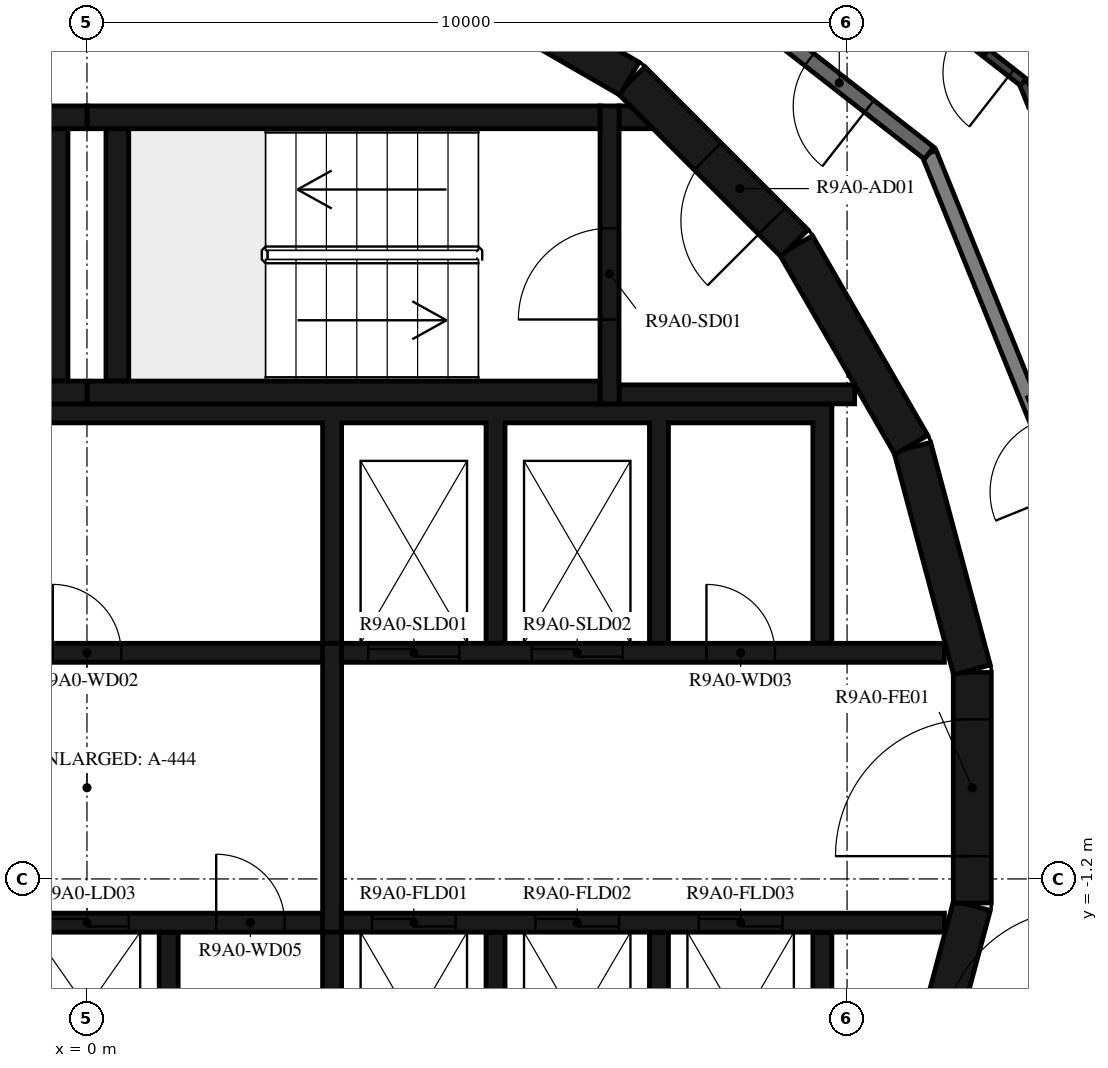
"""IFC4 building model, lengths in metres.
Left out: names, types, materials, properties, quantities, classifications, styles, units other than length and angle.
Written with IfcOpenShell. Run it as: python <this file> out.ifc"""

import sys

from ifc_helpers import new_model, si_unit, direction, frame, frame_2d, origin, place, context, subcontext, project, spatial, polyline, rectangle, outline, extrude, element, fill, save


model = new_model("IFC4")
c1 = context("Model", 3, precision=1e-05, world=origin(), true_north=direction((0.0, 1.0)))
c2 = subcontext(c1, "Body", "Model", "MODEL_VIEW")
j1 = project(units=[si_unit("LENGTHUNIT", "METRE"), si_unit("PLANEANGLEUNIT", "RADIAN")], contexts=[c1])
p1 = place(None, origin())
s1 = spatial("IfcSite", under=j1, at=p1, CompositionType="ELEMENT")
p2 = place(p1, origin())
s2 = spatial("IfcBuilding", under=s1, at=p2, CompositionType="ELEMENT")
p3 = place(p2, frame((0.0, 0.0, 340.0)))
s3 = spatial("IfcBuildingStorey", under=s2, at=p3, CompositionType="ELEMENT", Elevation=340.0)
p4 = place(p3, frame((10.858, -4.479, 0.0), z_axis=(0.0, 0.0, 1.0), x_axis=(0.258734743916, 0.965948410781, 0.0)))
e1 = element("IfcWall", 1, at=p4, inside=s3, PredefinedType="SHEAR", context=c2, shape_type="SweptSolid", body=[
    extrude(rectangle(XDim=3.033, YDim=0.5, at=frame_2d((1.516, 0.0))), origin(), (0.0, 0.0, 1.0), 3.12),
])
p5 = place(p3, frame((11.647, -1.516, 0.0), z_axis=(0.0, 0.0, 1.0), x_axis=(0.0, 1.0, 0.0)))
e2 = element("IfcWall", 2, at=p5, inside=s3, PredefinedType="SHEAR", context=c2, shape_type="SweptSolid", body=[
    extrude(rectangle(XDim=3.033, YDim=0.5, at=frame_2d((1.516, 0.0))), origin(), (0.0, 0.0, 1.0), 3.12),
])
p6 = place(p5, frame((0.616, 0.0, 0.0)))
e3 = element("IfcOpeningElement", 3, at=p6, cuts=e2, PredefinedType="OPENING", context=c2, shape_type="SweptSolid", body=[
    extrude(rectangle(XDim=1.8, YDim=2.1, at=frame_2d((0.9, 1.05))), frame((0.0, 0.26, 0.0), z_axis=(0.0, -1.0, 0.0), x_axis=(1.0, 0.0, 0.0)), (0.0, 0.0, 1.0), 0.52),
])
for number, where, z_axis, x_axis in (
    (4, (11.643, 1.55, 0.0), (0.0, 0.0, 1.0), (-0.259, 0.966, 0.0)),
    (5, (10.845, 4.51, 0.0), (0.0, 0.0, 1.0), (-0.5, 0.866, 0.0)),
):
    element("IfcWall", number, at=place(p3, frame(where, z_axis=z_axis, x_axis=x_axis)), inside=s3, PredefinedType="SHEAR", context=c2, shape_type="SweptSolid", body=[
        extrude(rectangle(XDim=3.033, YDim=0.5, at=frame_2d((1.516, 0.0))), origin(), (0.0, 0.0, 1.0), 3.12),
    ])
p7 = place(p3, frame((9.308, 7.164, 0.0), z_axis=(0.0, 0.0, 1.0), x_axis=(-0.707106781187, 0.707106781187, 0.0)))
e6 = element("IfcWall", 6, at=p7, inside=s3, PredefinedType="SHEAR", context=c2, shape_type="SweptSolid", body=[
    extrude(rectangle(XDim=3.032, YDim=0.5, at=frame_2d((1.516, 0.0))), origin(), (0.0, 0.0, 1.0), 3.12),
])
p8 = place(p7, frame((0.416, 0.0, 0.0)))
e7 = element("IfcOpeningElement", 7, at=p8, cuts=e6, PredefinedType="OPENING", context=c2, shape_type="SweptSolid", body=[
    extrude(rectangle(XDim=1.2, YDim=2.1, at=frame_2d((0.6, 1.05))), frame((0.0, 0.26, 0.0), z_axis=(0.0, -1.0, 0.0), x_axis=(1.0, 0.0, 0.0)), (0.0, 0.0, 1.0), 0.52),
])
p9 = place(p3, frame((7.137, 9.329, 0.0), z_axis=(0.0, 0.0, 1.0), x_axis=(-0.865975092491, 0.500087131594, 0.0)))
e8 = element("IfcWall", 8, at=p9, inside=s3, PredefinedType="SHEAR", context=c2, shape_type="SweptSolid", body=[
    extrude(rectangle(XDim=3.033, YDim=0.5, at=frame_2d((1.516, 0.0))), origin(), (0.0, 0.0, 1.0), 3.12),
])
for number, where, z_axis, x_axis in (
    (9, (0.0, 5.2, 0.0), (0.0, 0.0, 1.0), (1.0, 0.0, 0.0)),
    (10, (0.0, 8.82, 0.0), (0.0, 0.0, 1.0), (1.0, 0.0, 0.0)),
):
    element("IfcWall", number, at=place(p3, frame(where, z_axis=z_axis, x_axis=x_axis)), inside=s3, PredefinedType="SHEAR", context=c2, shape_type="SweptSolid", body=[
        extrude(rectangle(XDim=6.75, YDim=0.3, at=frame_2d((3.375, 0.0))), origin(), (0.0, 0.0, 1.0), 3.12),
    ])
p10 = place(p3, frame((0.4, 5.35, 0.0), z_axis=(0.0, 0.0, 1.0), x_axis=(0.0, 1.0, 0.0)))
e11 = element("IfcWall", 11, at=p10, inside=s3, PredefinedType="SHEAR", context=c2, shape_type="SweptSolid", body=[
    extrude(rectangle(XDim=3.32, YDim=0.3, at=frame_2d((1.66, 0.0))), origin(), (0.0, 0.0, 1.0), 3.12),
])
p11 = place(p3, frame((6.875, 5.05, 0.0), z_axis=(0.0, 0.0, 1.0), x_axis=(0.0, 1.0, 0.0)))
e12 = element("IfcWall", 12, at=p11, inside=s3, PredefinedType="SHEAR", context=c2, shape_type="SweptSolid", body=[
    extrude(rectangle(XDim=3.92, YDim=0.25, at=frame_2d((1.96, 0.0))), origin(), (0.0, 0.0, 1.0), 3.12),
])
p12 = place(p11, frame((1.11, 0.0, 0.0)))
e13 = element("IfcOpeningElement", 13, at=p12, cuts=e12, PredefinedType="OPENING", context=c2, shape_type="SweptSolid", body=[
    extrude(rectangle(XDim=1.2, YDim=2.1, at=frame_2d((0.6, 1.05))), frame((0.0, 0.135, 0.0), z_axis=(0.0, -1.0, 0.0), x_axis=(1.0, 0.0, 0.0)), (0.0, 0.0, 1.0), 0.27),
])
p13 = place(p3, frame((7.0, 5.175, 0.0), z_axis=(0.0, 0.0, 1.0), x_axis=(1.0, 0.0, 0.0)))
e14 = element("IfcWall", 14, at=p13, inside=s3, PredefinedType="SHEAR", context=c2, shape_type="SweptSolid", body=[
    extrude(rectangle(XDim=3.1, YDim=0.25, at=frame_2d((1.55, 0.0))), origin(), (0.0, 0.0, 1.0), 3.12),
])
p14 = place(p3, origin())
e15 = element("IfcWall", 15, at=p14, inside=s3, PredefinedType="SHEAR", context=c2, shape_type="SweptSolid", body=[
    extrude(outline(polyline([(7.448, 8.67), (7.0, 8.67), (7.0, 8.97), (7.148, 8.97), (7.448, 8.67)])), origin(), (0.0, 0.0, 1.0), 3.12),
])
for number, where, z_axis, x_axis in (
    (16, (-6.75, 5.2, 0.0), (0.0, 0.0, 1.0), (1.0, 0.0, 0.0)),
    (17, (-6.75, 8.82, 0.0), (0.0, 0.0, 1.0), (1.0, 0.0, 0.0)),
):
    element("IfcWall", number, at=place(p3, frame(where, z_axis=z_axis, x_axis=x_axis)), inside=s3, PredefinedType="SHEAR", context=c2, shape_type="SweptSolid", body=[
        extrude(rectangle(XDim=6.75, YDim=0.3, at=frame_2d((3.375, 0.0))), origin(), (0.0, 0.0, 1.0), 3.12),
    ])
p15 = place(p3, frame((-0.4, 5.35, 0.0), z_axis=(0.0, 0.0, 1.0), x_axis=(0.0, 1.0, 0.0)))
e18 = element("IfcWall", 18, at=p15, inside=s3, PredefinedType="SHEAR", context=c2, shape_type="SweptSolid", body=[
    extrude(rectangle(XDim=3.32, YDim=0.3, at=frame_2d((1.66, 0.0))), origin(), (0.0, 0.0, 1.0), 3.12),
])
p16 = place(p3, origin())
e19 = element("IfcWall", 19, at=p16, inside=s3, PredefinedType="SHEAR", context=c2, shape_type="SweptSolid", body=[
    extrude(outline(polyline([(-9.8, 1.9), (-9.55, 1.9), (-9.55, 4.8), (-3.35, 4.8), (-3.35, 1.9), (-3.1, 1.9), (-3.1, 4.8), (3.1, 4.8), (3.1, 1.9), (3.35, 1.9), (3.35, 4.8), (5.25, 4.8), (5.25, 1.9), (5.5, 1.9), (5.5, 4.8), (7.4, 4.8), (7.4, 1.9), (7.65, 1.9), (7.65, 4.8), (9.55, 4.8), (9.55, 1.9), (9.8, 1.9), (9.8, 4.8), (9.8, 5.05), (-9.8, 5.05), (-9.8, 4.8), (-9.8, 1.9)])), origin(), (0.0, 0.0, 1.0), 3.12),
])
p17 = place(p3, origin())
e20 = element("IfcWall", 20, at=p17, inside=s3, PredefinedType="SHEAR", context=c2, shape_type="SweptSolid", body=[
    extrude(outline(polyline([(9.8, -5.05), (9.8, -4.8), (9.8, -1.9), (9.55, -1.9), (9.55, -4.8), (7.65, -4.8), (7.65, -1.9), (7.4, -1.9), (7.4, -4.8), (5.5, -4.8), (5.5, -1.9), (5.25, -1.9), (5.25, -4.8), (3.35, -4.8), (3.35, -1.9), (3.1, -1.9), (3.1, -4.8), (1.2, -4.8), (1.2, -1.9), (0.95, -1.9), (0.95, -4.8), (-0.95, -4.8), (-0.95, -1.9), (-1.2, -1.9), (-1.2, -4.8), (-3.1, -4.8), (-3.1, -1.9), (-3.35, -1.9), (-3.35, -4.8), (-5.25, -4.8), (-5.25, -1.9), (-5.5, -1.9), (-5.5, -4.8), (-9.55, -4.8), (-9.55, -1.9), (-9.8, -1.9), (-9.8, -4.8), (-9.8, -5.05), (9.8, -5.05)])), origin(), (0.0, 0.0, 1.0), 3.12),
])
p18 = place(p3, frame((-11.28, 1.775, 0.0), z_axis=(0.0, 0.0, 1.0), x_axis=(1.0, 0.0, 0.0)))
e21 = element("IfcWall", 21, at=p18, inside=s3, PredefinedType="SHEAR", context=c2, shape_type="SweptSolid", body=[
    extrude(rectangle(XDim=14.38, YDim=0.25, at=frame_2d((7.19, 0.0))), origin(), (0.0, 0.0, 1.0), 3.12),
])
p19 = place(p18, frame((4.38, 0.0, 0.0)))
e22 = element("IfcOpeningElement", 22, at=p19, cuts=e21, PredefinedType="OPENING", context=c2, shape_type="SweptSolid", body=[
    extrude(rectangle(XDim=0.9, YDim=2.1, at=frame_2d((0.45, 1.05))), frame((0.0, 0.135, 0.0), z_axis=(0.0, -1.0, 0.0), x_axis=(1.0, 0.0, 0.0)), (0.0, 0.0, 1.0), 0.27),
])
p20 = place(p18, frame((10.83, 0.0, 0.0)))
e23 = element("IfcOpeningElement", 23, at=p20, cuts=e21, PredefinedType="OPENING", context=c2, shape_type="SweptSolid", body=[
    extrude(rectangle(XDim=0.9, YDim=2.1, at=frame_2d((0.45, 1.05))), frame((0.0, 0.135, 0.0), z_axis=(0.0, -1.0, 0.0), x_axis=(1.0, 0.0, 0.0)), (0.0, 0.0, 1.0), 0.27),
])
p21 = place(p3, frame((3.35, 1.775, 0.0), z_axis=(0.0, 0.0, 1.0), x_axis=(1.0, 0.0, 0.0)))
e24 = element("IfcWall", 24, at=p21, inside=s3, PredefinedType="SHEAR", context=c2, shape_type="SweptSolid", body=[
    extrude(rectangle(XDim=7.93, YDim=0.25, at=frame_2d((3.965, 0.0))), origin(), (0.0, 0.0, 1.0), 3.12),
])
p22 = place(p21, frame((0.35, 0.0, 0.0)))
e25 = element("IfcOpeningElement", 25, at=p22, cuts=e24, PredefinedType="OPENING", context=c2, shape_type="SweptSolid", body=[
    extrude(rectangle(XDim=1.2, YDim=2.4, at=frame_2d((0.6, 1.2))), frame((0.0, 0.135, 0.0), z_axis=(0.0, -1.0, 0.0), x_axis=(1.0, 0.0, 0.0)), (0.0, 0.0, 1.0), 0.27),
])
p23 = place(p21, frame((2.5, 0.0, 0.0)))
e26 = element("IfcOpeningElement", 26, at=p23, cuts=e24, PredefinedType="OPENING", context=c2, shape_type="SweptSolid", body=[
    extrude(rectangle(XDim=1.2, YDim=2.4, at=frame_2d((0.6, 1.2))), frame((0.0, 0.135, 0.0), z_axis=(0.0, -1.0, 0.0), x_axis=(1.0, 0.0, 0.0)), (0.0, 0.0, 1.0), 0.27),
])
p24 = place(p21, frame((4.8, 0.0, 0.0)))
e27 = element("IfcOpeningElement", 27, at=p24, cuts=e24, PredefinedType="OPENING", context=c2, shape_type="SweptSolid", body=[
    extrude(rectangle(XDim=0.9, YDim=2.1, at=frame_2d((0.45, 1.05))), frame((0.0, 0.135, 0.0), z_axis=(0.0, -1.0, 0.0), x_axis=(1.0, 0.0, 0.0)), (0.0, 0.0, 1.0), 0.27),
])
p25 = place(p3, frame((-11.28, -1.775, 0.0), z_axis=(0.0, 0.0, 1.0), x_axis=(1.0, 0.0, 0.0)))
e28 = element("IfcWall", 28, at=p25, inside=s3, PredefinedType="SHEAR", context=c2, shape_type="SweptSolid", body=[
    extrude(rectangle(XDim=14.38, YDim=0.25, at=frame_2d((7.19, 0.0))), origin(), (0.0, 0.0, 1.0), 3.12),
])
p26 = place(p25, frame((6.43, 0.0, 0.0)))
e29 = element("IfcOpeningElement", 29, at=p26, cuts=e28, PredefinedType="OPENING", context=c2, shape_type="SweptSolid", body=[
    extrude(rectangle(XDim=1.1, YDim=2.1, at=frame_2d((0.55, 1.05))), frame((0.0, 0.135, 0.0), z_axis=(0.0, -1.0, 0.0), x_axis=(1.0, 0.0, 0.0)), (0.0, 0.0, 1.0), 0.27),
])
p27 = place(p25, frame((8.58, 0.0, 0.0)))
e30 = element("IfcOpeningElement", 30, at=p27, cuts=e28, PredefinedType="OPENING", context=c2, shape_type="SweptSolid", body=[
    extrude(rectangle(XDim=1.1, YDim=2.1, at=frame_2d((0.55, 1.05))), frame((0.0, 0.135, 0.0), z_axis=(0.0, -1.0, 0.0), x_axis=(1.0, 0.0, 0.0)), (0.0, 0.0, 1.0), 0.27),
])
p28 = place(p25, frame((10.73, 0.0, 0.0)))
e31 = element("IfcOpeningElement", 31, at=p28, cuts=e28, PredefinedType="OPENING", context=c2, shape_type="SweptSolid", body=[
    extrude(rectangle(XDim=1.1, YDim=2.1, at=frame_2d((0.55, 1.05))), frame((0.0, 0.135, 0.0), z_axis=(0.0, -1.0, 0.0), x_axis=(1.0, 0.0, 0.0)), (0.0, 0.0, 1.0), 0.27),
])
p29 = place(p25, frame((3.305, 0.0, 0.0)))
e32 = element("IfcOpeningElement", 32, at=p29, cuts=e28, PredefinedType="OPENING", context=c2, shape_type="SweptSolid", body=[
    extrude(rectangle(XDim=0.9, YDim=2.1, at=frame_2d((0.45, 1.05))), frame((0.0, 0.135, 0.0), z_axis=(0.0, -1.0, 0.0), x_axis=(1.0, 0.0, 0.0)), (0.0, 0.0, 1.0), 0.27),
])
p30 = place(p25, frame((12.98, 0.0, 0.0)))
e33 = element("IfcOpeningElement", 33, at=p30, cuts=e28, PredefinedType="OPENING", context=c2, shape_type="SweptSolid", body=[
    extrude(rectangle(XDim=0.9, YDim=2.1, at=frame_2d((0.45, 1.05))), frame((0.0, 0.135, 0.0), z_axis=(0.0, -1.0, 0.0), x_axis=(1.0, 0.0, 0.0)), (0.0, 0.0, 1.0), 0.27),
])
p31 = place(p3, frame((3.35, -1.775, 0.0), z_axis=(0.0, 0.0, 1.0), x_axis=(1.0, 0.0, 0.0)))
e34 = element("IfcWall", 34, at=p31, inside=s3, PredefinedType="SHEAR", context=c2, shape_type="SweptSolid", body=[
    extrude(rectangle(XDim=7.93, YDim=0.25, at=frame_2d((3.965, 0.0))), origin(), (0.0, 0.0, 1.0), 3.12),
])
p32 = place(p31, frame((0.4, 0.0, 0.0)))
e35 = element("IfcOpeningElement", 35, at=p32, cuts=e34, PredefinedType="OPENING", context=c2, shape_type="SweptSolid", body=[
    extrude(rectangle(XDim=1.1, YDim=2.4, at=frame_2d((0.55, 1.2))), frame((0.0, 0.135, 0.0), z_axis=(0.0, -1.0, 0.0), x_axis=(1.0, 0.0, 0.0)), (0.0, 0.0, 1.0), 0.27),
])
p33 = place(p31, frame((2.55, 0.0, 0.0)))
e36 = element("IfcOpeningElement", 36, at=p33, cuts=e34, PredefinedType="OPENING", context=c2, shape_type="SweptSolid", body=[
    extrude(rectangle(XDim=1.1, YDim=2.4, at=frame_2d((0.55, 1.2))), frame((0.0, 0.135, 0.0), z_axis=(0.0, -1.0, 0.0), x_axis=(1.0, 0.0, 0.0)), (0.0, 0.0, 1.0), 0.27),
])
p34 = place(p31, frame((4.7, 0.0, 0.0)))
e37 = element("IfcOpeningElement", 37, at=p34, cuts=e34, PredefinedType="OPENING", context=c2, shape_type="SweptSolid", body=[
    extrude(rectangle(XDim=1.1, YDim=2.4, at=frame_2d((0.55, 1.2))), frame((0.0, 0.135, 0.0), z_axis=(0.0, -1.0, 0.0), x_axis=(1.0, 0.0, 0.0)), (0.0, 0.0, 1.0), 0.27),
])
p35 = place(p3, frame((3.225, -1.9, 0.0), z_axis=(0.0, 0.0, 1.0), x_axis=(0.0, 1.0, 0.0)))
e38 = element("IfcWall", 38, at=p35, inside=s3, PredefinedType="SHEAR", context=c2, shape_type="SweptSolid", body=[
    extrude(rectangle(XDim=3.8, YDim=0.25, at=frame_2d((1.9, 0.0))), origin(), (0.0, 0.0, 1.0), 3.12),
])
p36 = place(p3, frame((13.769, 1.691, 0.0), z_axis=(0.0, 0.0, 1.0), x_axis=(-0.374618189599, 0.92717916932, 0.0)))
e39 = element("IfcWall", 39, at=p36, inside=s3, PredefinedType="STANDARD", context=c2, shape_type="SweptSolid", body=[
    extrude(rectangle(XDim=7.181, YDim=0.2, at=frame_2d((3.591, 0.0))), origin(), (0.0, 0.0, 1.0), 3.12),
])
p37 = place(p36, frame((2.371, 0.0, 0.0)))
e40 = element("IfcOpeningElement", 40, at=p37, cuts=e39, PredefinedType="OPENING", context=c2, shape_type="SweptSolid", body=[
    extrude(rectangle(XDim=1.0, YDim=2.1, at=frame_2d((0.5, 1.05))), frame((0.0, 0.11, 0.0), z_axis=(0.0, -1.0, 0.0), x_axis=(1.0, 0.0, 0.0)), (0.0, 0.0, 1.0), 0.22),
])
p38 = place(p3, frame((11.079, 8.349, 0.0), z_axis=(0.0, 0.0, 1.0), x_axis=(-0.78800478687, 0.615669112324, 0.0)))
e41 = element("IfcWall", 41, at=p38, inside=s3, PredefinedType="STANDARD", context=c2, shape_type="SweptSolid", body=[
    extrude(rectangle(XDim=7.181, YDim=0.2, at=frame_2d((3.591, 0.0))), origin(), (0.0, 0.0, 1.0), 3.12),
])
p39 = place(p38, frame((1.0, 0.0, 0.0)))
e42 = element("IfcOpeningElement", 42, at=p39, cuts=e41, PredefinedType="OPENING", context=c2, shape_type="SweptSolid", body=[
    extrude(rectangle(XDim=1.0, YDim=2.1, at=frame_2d((0.5, 1.05))), frame((0.0, 0.11, 0.0), z_axis=(0.0, -1.0, 0.0), x_axis=(1.0, 0.0, 0.0)), (0.0, 0.0, 1.0), 0.22),
])
p40 = place(p3, frame((13.807, 5.601, 0.0), z_axis=(0.0, 0.0, 1.0), x_axis=(-0.927202702405, -0.374559939999, 0.0)))
e43 = element("IfcWall", 43, at=p40, inside=s3, PredefinedType="STANDARD", context=c2, shape_type="SweptSolid", body=[
    extrude(rectangle(XDim=1.5, YDim=0.2, at=frame_2d((0.75, 0.0))), origin(), (0.0, 0.0, 1.0), 3.12),
])
p41 = place(p3, frame((12.442, 8.979, 0.0), z_axis=(0.0, 0.0, 1.0), x_axis=(-0.374979656603, 0.927033039936, 0.0)))
e44 = element("IfcWall", 44, at=p41, inside=s3, PredefinedType="PARTITIONING", context=c2, shape_type="SweptSolid", body=[
    extrude(rectangle(XDim=0.328, YDim=0.12, at=frame_2d((0.164, 0.0))), origin(), (0.0, 0.0, 1.0), 3.12),
])
p42 = place(p3, frame((12.319, 9.283, 0.0), z_axis=(0.0, 0.0, 1.0), x_axis=(-0.788000268464, 0.61567489546, 0.0)))
e45 = element("IfcWall", 45, at=p42, inside=s3, PredefinedType="PARTITIONING", context=c2, shape_type="SweptSolid", body=[
    extrude(rectangle(XDim=7.985, YDim=0.12, at=frame_2d((3.992, 0.0))), origin(), (0.0, 0.0, 1.0), 3.12),
])
p43 = place(p42, frame((0.2, 0.0, 0.0)))
e46 = element("IfcOpeningElement", 46, at=p43, cuts=e45, PredefinedType="OPENING", context=c2, shape_type="SweptSolid", body=[
    extrude(rectangle(XDim=0.9, YDim=2.1, at=frame_2d((0.45, 1.05))), frame((0.0, 0.07, 0.0), z_axis=(0.0, -1.0, 0.0), x_axis=(1.0, 0.0, 0.0)), (0.0, 0.0, 1.0), 0.14),
])
p44 = place(p12, origin())
e47 = element("IfcDoor", 47, at=p44, inside=s3, OperationType="SINGLE_SWING_LEFT", PredefinedType="DOOR", context=c2, shape_type="SweptSolid", body=[
    extrude(rectangle(XDim=1.2, YDim=2.1, at=frame_2d((0.6, 1.05))), frame((0.0, 0.025, 0.0), z_axis=(0.0, -1.0, 0.0), x_axis=(1.0, 0.0, 0.0)), (0.0, 0.0, 1.0), 0.05),
])
fill(e13, e47)
p45 = place(p8, origin())
e48 = element("IfcDoor", 48, at=p45, inside=s3, OperationType="SINGLE_SWING_RIGHT", PredefinedType="DOOR", context=c2, shape_type="SweptSolid", body=[
    extrude(rectangle(XDim=1.2, YDim=2.1, at=frame_2d((0.6, 1.05))), frame((0.0, 0.025, 0.0), z_axis=(0.0, -1.0, 0.0), x_axis=(1.0, 0.0, 0.0)), (0.0, 0.0, 1.0), 0.05),
])
fill(e7, e48)
p46 = place(p6, origin())
e49 = element("IfcDoor", 49, at=p46, inside=s3, OperationType="DOUBLE_DOOR_SINGLE_SWING", PredefinedType="DOOR", context=c2, shape_type="SweptSolid", body=[
    extrude(rectangle(XDim=1.8, YDim=2.1, at=frame_2d((0.9, 1.05))), frame((0.0, 0.025, 0.0), z_axis=(0.0, -1.0, 0.0), x_axis=(1.0, 0.0, 0.0)), (0.0, 0.0, 1.0), 0.05),
])
fill(e3, e49)
p47 = place(p22, origin())
e50 = element("IfcDoor", 50, at=p47, inside=s3, OperationType="DOUBLE_DOOR_SLIDING", PredefinedType="DOOR", context=c2, shape_type="SweptSolid", body=[
    extrude(rectangle(XDim=1.2, YDim=2.4, at=frame_2d((0.6, 1.2))), frame((0.0, 0.025, 0.0), z_axis=(0.0, -1.0, 0.0), x_axis=(1.0, 0.0, 0.0)), (0.0, 0.0, 1.0), 0.05),
])
fill(e25, e50)
p48 = place(p23, origin())
e51 = element("IfcDoor", 51, at=p48, inside=s3, OperationType="DOUBLE_DOOR_SLIDING", PredefinedType="DOOR", context=c2, shape_type="SweptSolid", body=[
    extrude(rectangle(XDim=1.2, YDim=2.4, at=frame_2d((0.6, 1.2))), frame((0.0, 0.025, 0.0), z_axis=(0.0, -1.0, 0.0), x_axis=(1.0, 0.0, 0.0)), (0.0, 0.0, 1.0), 0.05),
])
fill(e26, e51)
p49 = place(p28, origin())
e52 = element("IfcDoor", 52, at=p49, inside=s3, OperationType="DOUBLE_DOOR_SLIDING", PredefinedType="DOOR", context=c2, shape_type="SweptSolid", body=[
    extrude(rectangle(XDim=1.1, YDim=2.1, at=frame_2d((0.55, 1.05))), frame((0.0, 0.025, 0.0), z_axis=(0.0, -1.0, 0.0), x_axis=(1.0, 0.0, 0.0)), (0.0, 0.0, 1.0), 0.05),
])
fill(e31, e52)
p50 = place(p32, origin())
e53 = element("IfcDoor", 53, at=p50, inside=s3, OperationType="DOUBLE_DOOR_SLIDING", PredefinedType="DOOR", context=c2, shape_type="SweptSolid", body=[
    extrude(rectangle(XDim=1.1, YDim=2.4, at=frame_2d((0.55, 1.2))), frame((0.0, 0.025, 0.0), z_axis=(0.0, -1.0, 0.0), x_axis=(1.0, 0.0, 0.0)), (0.0, 0.0, 1.0), 0.05),
])
fill(e35, e53)
p51 = place(p33, origin())
e54 = element("IfcDoor", 54, at=p51, inside=s3, OperationType="DOUBLE_DOOR_SLIDING", PredefinedType="DOOR", context=c2, shape_type="SweptSolid", body=[
    extrude(rectangle(XDim=1.1, YDim=2.4, at=frame_2d((0.55, 1.2))), frame((0.0, 0.025, 0.0), z_axis=(0.0, -1.0, 0.0), x_axis=(1.0, 0.0, 0.0)), (0.0, 0.0, 1.0), 0.05),
])
fill(e36, e54)
p52 = place(p34, origin())
e55 = element("IfcDoor", 55, at=p52, inside=s3, OperationType="DOUBLE_DOOR_SLIDING", PredefinedType="DOOR", context=c2, shape_type="SweptSolid", body=[
    extrude(rectangle(XDim=1.1, YDim=2.4, at=frame_2d((0.55, 1.2))), frame((0.0, 0.025, 0.0), z_axis=(0.0, -1.0, 0.0), x_axis=(1.0, 0.0, 0.0)), (0.0, 0.0, 1.0), 0.05),
])
fill(e37, e55)
p53 = place(p20, origin())
e56 = element("IfcDoor", 56, at=p53, inside=s3, OperationType="SINGLE_SWING_RIGHT", PredefinedType="DOOR", context=c2, shape_type="SweptSolid", body=[
    extrude(rectangle(XDim=0.9, YDim=2.1, at=frame_2d((0.45, 1.05))), frame((0.0, 0.025, 0.0), z_axis=(0.0, -1.0, 0.0), x_axis=(1.0, 0.0, 0.0)), (0.0, 0.0, 1.0), 0.05),
])
fill(e23, e56)
p54 = place(p24, origin())
e57 = element("IfcDoor", 57, at=p54, inside=s3, OperationType="SINGLE_SWING_LEFT", PredefinedType="DOOR", context=c2, shape_type="SweptSolid", body=[
    extrude(rectangle(XDim=0.9, YDim=2.1, at=frame_2d((0.45, 1.05))), frame((0.0, 0.025, 0.0), z_axis=(0.0, -1.0, 0.0), x_axis=(1.0, 0.0, 0.0)), (0.0, 0.0, 1.0), 0.05),
])
fill(e27, e57)
p55 = place(p30, origin())
e58 = element("IfcDoor", 58, at=p55, inside=s3, OperationType="SINGLE_SWING_LEFT", PredefinedType="DOOR", context=c2, shape_type="SweptSolid", body=[
    extrude(rectangle(XDim=0.9, YDim=2.1, at=frame_2d((0.45, 1.05))), frame((0.0, 0.025, 0.0), z_axis=(0.0, -1.0, 0.0), x_axis=(1.0, 0.0, 0.0)), (0.0, 0.0, 1.0), 0.05),
])
fill(e33, e58)
p56 = place(p39, origin())
e59 = element("IfcDoor", 59, at=p56, inside=s3, OperationType="SINGLE_SWING_LEFT", PredefinedType="DOOR", context=c2, shape_type="SweptSolid", body=[
    extrude(rectangle(XDim=1.0, YDim=2.1, at=frame_2d((0.5, 1.05))), frame((0.0, 0.025, 0.0), z_axis=(0.0, -1.0, 0.0), x_axis=(1.0, 0.0, 0.0)), (0.0, 0.0, 1.0), 0.05),
])
fill(e42, e59)
p57 = place(p43, origin())
e60 = element("IfcDoor", 60, at=p57, inside=s3, OperationType="SINGLE_SWING_LEFT", PredefinedType="DOOR", context=c2, shape_type="SweptSolid", body=[
    extrude(rectangle(XDim=0.9, YDim=2.1, at=frame_2d((0.45, 1.05))), frame((0.0, 0.025, 0.0), z_axis=(0.0, -1.0, 0.0), x_axis=(1.0, 0.0, 0.0)), (0.0, 0.0, 1.0), 0.05),
])
fill(e46, e60)
save(model, sys.argv[1])
